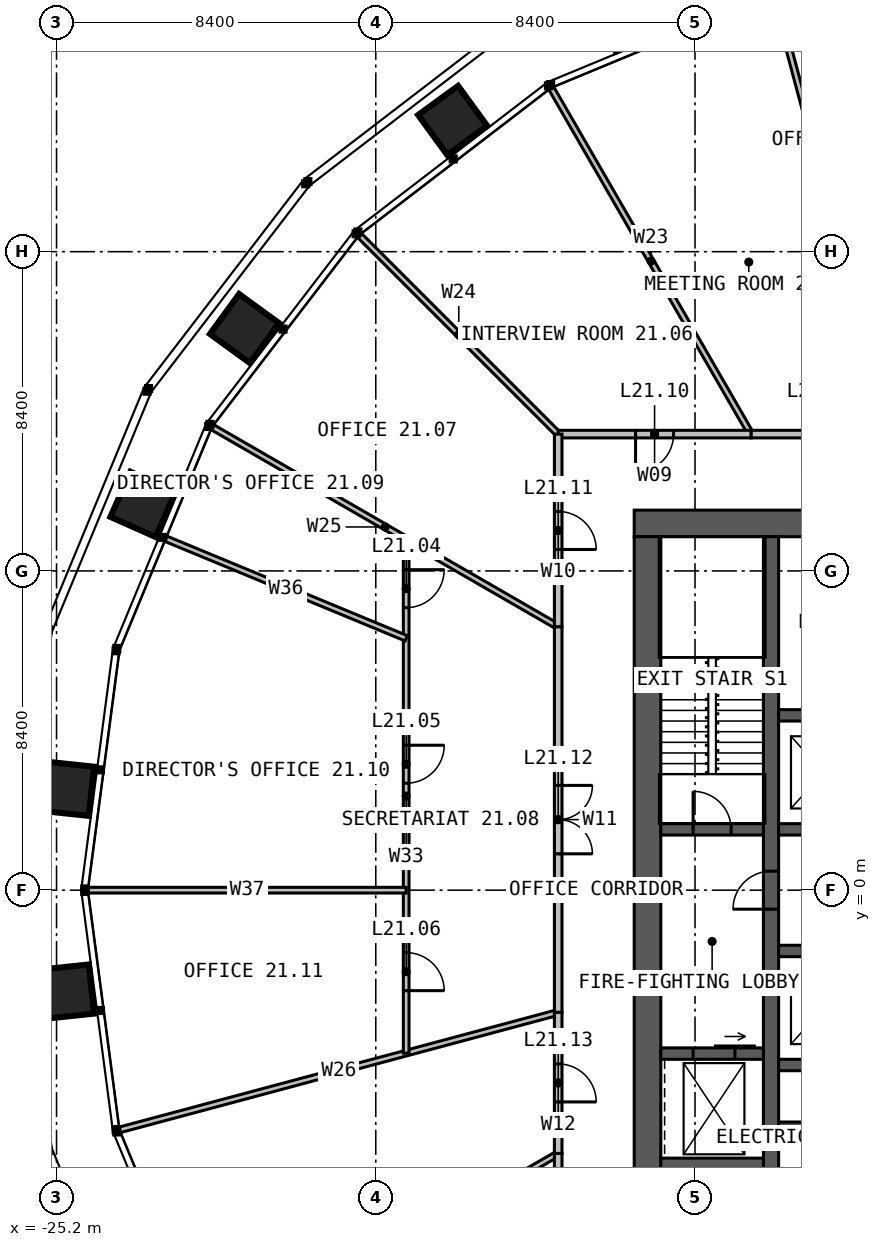
"""IFC4 building model, lengths in metres.
Left out: names, types, materials, properties, quantities, classifications, styles, units other than length and angle.
Written with IfcOpenShell. Run it as: python <this file> out.ifc"""

import sys

from ifc_helpers import new_model, si_unit, direction, frame, frame_2d, origin, place, context, subcontext, project, spatial, rectangle, extrude, element, fill, save


model = new_model("IFC4")
c1 = context("Model", 3, precision=1e-05, world=origin(), true_north=direction((0.0, 1.0)))
c2 = subcontext(c1, "Body", "Model", "MODEL_VIEW")
j1 = project(units=[si_unit("LENGTHUNIT", "METRE"), si_unit("PLANEANGLEUNIT", "RADIAN")], contexts=[c1])
p1 = place(None, origin())
s1 = spatial("IfcSite", under=j1, at=p1, CompositionType="ELEMENT")
p2 = place(p1, origin())
s2 = spatial("IfcBuilding", under=s1, at=p2, CompositionType="ELEMENT")
p3 = place(p2, frame((0.0, 0.0, 90.0)))
s3 = spatial("IfcBuildingStorey", under=s2, at=p3, CompositionType="ELEMENT", Elevation=90.0)
p4 = place(p3, frame((-10.0, 9.65, 0.0), z_axis=(0.0, 0.0, 1.0), x_axis=(1.0, 0.0, 0.0)))
e1 = element("IfcWall", 1, at=p4, inside=s3, PredefinedType="SOLIDWALL", context=c2, shape_type="SweptSolid", body=[
    extrude(rectangle(XDim=20.0, YDim=0.7, at=frame_2d((10.0, 0.0))), origin(), (0.0, 0.0, 1.0), 4.0),
])
p5 = place(p4, frame((9.4, 0.0, 0.0)))
e2 = element("IfcOpeningElement", 2, at=p5, cuts=e1, PredefinedType="OPENING", context=c2, shape_type="SweptSolid", body=[
    extrude(rectangle(XDim=1.2, YDim=2.2, at=frame_2d((0.6, 1.1))), frame((0.0, 0.36, 0.0), z_axis=(0.0, -1.0, 0.0), x_axis=(1.0, 0.0, 0.0)), (0.0, 0.0, 1.0), 0.72),
])
p6 = place(p3, frame((-9.65, 9.3, 0.0), z_axis=(0.0, 0.0, 1.0), x_axis=(0.0, -1.0, 0.0)))
e3 = element("IfcWall", 3, at=p6, inside=s3, PredefinedType="SOLIDWALL", context=c2, shape_type="SweptSolid", body=[
    extrude(rectangle(XDim=18.6, YDim=0.7, at=frame_2d((9.3, 0.0))), origin(), (0.0, 0.0, 1.0), 4.0),
])
p7 = place(p3, frame((-6.4, -9.3, 0.0), z_axis=(0.0, 0.0, 1.0), x_axis=(0.0, 1.0, 0.0)))
e4 = element("IfcWall", 4, at=p7, inside=s3, PredefinedType="SOLIDWALL", context=c2, shape_type="SweptSolid", body=[
    extrude(rectangle(XDim=18.6, YDim=0.4, at=frame_2d((9.3, 0.0))), origin(), (0.0, 0.0, 1.0), 4.0),
])
p8 = place(p7, frame((8.8, 0.0, 0.0)))
e5 = element("IfcOpeningElement", 5, at=p8, cuts=e4, PredefinedType="OPENING", context=c2, shape_type="SweptSolid", body=[
    extrude(rectangle(XDim=1.0, YDim=2.2, at=frame_2d((0.5, 1.1))), frame((0.0, 0.21, 0.0), z_axis=(0.0, -1.0, 0.0), x_axis=(1.0, 0.0, 0.0)), (0.0, 0.0, 1.0), 0.42),
])
p9 = place(p3, frame((-6.2, 1.6, 0.0), z_axis=(0.0, 0.0, 1.0), x_axis=(1.0, 0.0, 0.0)))
e6 = element("IfcWall", 6, at=p9, inside=s3, PredefinedType="SOLIDWALL", context=c2, shape_type="SweptSolid", body=[
    extrude(rectangle(XDim=4.85, YDim=0.3, at=frame_2d((2.425, 0.0))), origin(), (0.0, 0.0, 1.0), 4.0),
])
p10 = place(p9, frame((0.625, 0.0, 0.0)))
e7 = element("IfcOpeningElement", 7, at=p10, cuts=e6, PredefinedType="OPENING", context=c2, shape_type="SweptSolid", body=[
    extrude(rectangle(XDim=1.1, YDim=2.2, at=frame_2d((0.55, 1.1))), frame((0.0, 0.16, 0.0), z_axis=(0.0, -1.0, 0.0), x_axis=(1.0, 0.0, 0.0)), (0.0, 0.0, 1.0), 0.32),
])
p11 = place(p9, frame((3.15, 0.0, 0.0)))
e8 = element("IfcOpeningElement", 8, at=p11, cuts=e6, PredefinedType="OPENING", context=c2, shape_type="SweptSolid", body=[
    extrude(rectangle(XDim=1.1, YDim=2.2, at=frame_2d((0.55, 1.1))), frame((0.0, 0.16, 0.0), z_axis=(0.0, -1.0, 0.0), x_axis=(1.0, 0.0, 0.0)), (0.0, 0.0, 1.0), 0.32),
])
p12 = place(p3, frame((-6.2, 4.6, 0.0), z_axis=(0.0, 0.0, 1.0), x_axis=(1.0, 0.0, 0.0)))
e9 = element("IfcWall", 9, at=p12, inside=s3, PredefinedType="SOLIDWALL", context=c2, shape_type="SweptSolid", body=[
    extrude(rectangle(XDim=4.85, YDim=0.3, at=frame_2d((2.425, 0.0))), origin(), (0.0, 0.0, 1.0), 4.0),
])
p13 = place(p3, frame((-6.2, -1.6, 0.0), z_axis=(0.0, 0.0, 1.0), x_axis=(1.0, 0.0, 0.0)))
e10 = element("IfcWall", 10, at=p13, inside=s3, PredefinedType="SOLIDWALL", context=c2, shape_type="SweptSolid", body=[
    extrude(rectangle(XDim=7.4, YDim=0.3, at=frame_2d((3.7, 0.0))), origin(), (0.0, 0.0, 1.0), 4.0),
])
p14 = place(p13, frame((0.625, 0.0, 0.0)))
e11 = element("IfcOpeningElement", 11, at=p14, cuts=e10, PredefinedType="OPENING", context=c2, shape_type="SweptSolid", body=[
    extrude(rectangle(XDim=1.1, YDim=2.2, at=frame_2d((0.55, 1.1))), frame((0.0, 0.16, 0.0), z_axis=(0.0, -1.0, 0.0), x_axis=(1.0, 0.0, 0.0)), (0.0, 0.0, 1.0), 0.32),
])
p15 = place(p13, frame((3.15, 0.0, 0.0)))
e12 = element("IfcOpeningElement", 12, at=p15, cuts=e10, PredefinedType="OPENING", context=c2, shape_type="SweptSolid", body=[
    extrude(rectangle(XDim=1.1, YDim=2.2, at=frame_2d((0.55, 1.1))), frame((0.0, 0.16, 0.0), z_axis=(0.0, -1.0, 0.0), x_axis=(1.0, 0.0, 0.0)), (0.0, 0.0, 1.0), 0.32),
])
p16 = place(p13, frame((5.675, 0.0, 0.0)))
e13 = element("IfcOpeningElement", 13, at=p16, cuts=e10, PredefinedType="OPENING", context=c2, shape_type="SweptSolid", body=[
    extrude(rectangle(XDim=1.1, YDim=2.2, at=frame_2d((0.55, 1.1))), frame((0.0, 0.16, 0.0), z_axis=(0.0, -1.0, 0.0), x_axis=(1.0, 0.0, 0.0)), (0.0, 0.0, 1.0), 0.32),
])
p17 = place(p3, frame((-6.2, -4.6, 0.0), z_axis=(0.0, 0.0, 1.0), x_axis=(1.0, 0.0, 0.0)))
e14 = element("IfcWall", 14, at=p17, inside=s3, PredefinedType="SOLIDWALL", context=c2, shape_type="SweptSolid", body=[
    extrude(rectangle(XDim=7.4, YDim=0.3, at=frame_2d((3.7, 0.0))), origin(), (0.0, 0.0, 1.0), 4.0),
])
p18 = place(p3, frame((-6.2, -6.2, 0.0), z_axis=(0.0, 0.0, 1.0), x_axis=(1.0, 0.0, 0.0)))
e15 = element("IfcWall", 15, at=p18, inside=s3, PredefinedType="SOLIDWALL", context=c2, shape_type="SweptSolid", body=[
    extrude(rectangle(XDim=7.4, YDim=0.2, at=frame_2d((3.7, 0.0))), origin(), (0.0, 0.0, 1.0), 4.0),
])
p19 = place(p3, frame((-9.3, 1.6, 0.0), z_axis=(0.0, 0.0, 1.0), x_axis=(1.0, 0.0, 0.0)))
e16 = element("IfcWall", 16, at=p19, inside=s3, PredefinedType="SOLIDWALL", context=c2, shape_type="SweptSolid", body=[
    extrude(rectangle(XDim=2.7, YDim=0.3, at=frame_2d((1.35, 0.0))), origin(), (0.0, 0.0, 1.0), 4.0),
])
p20 = place(p19, frame((0.85, 0.0, 0.0)))
e17 = element("IfcOpeningElement", 17, at=p20, cuts=e16, PredefinedType="OPENING", context=c2, shape_type="SweptSolid", body=[
    extrude(rectangle(XDim=1.0, YDim=2.2, at=frame_2d((0.5, 1.1))), frame((0.0, 0.16, 0.0), z_axis=(0.0, -1.0, 0.0), x_axis=(1.0, 0.0, 0.0)), (0.0, 0.0, 1.0), 0.32),
])
p21 = place(p3, frame((-9.3, -4.3, 0.0), z_axis=(0.0, 0.0, 1.0), x_axis=(1.0, 0.0, 0.0)))
e18 = element("IfcWall", 18, at=p21, inside=s3, PredefinedType="SOLIDWALL", context=c2, shape_type="SweptSolid", body=[
    extrude(rectangle(XDim=2.7, YDim=0.3, at=frame_2d((1.35, 0.0))), origin(), (0.0, 0.0, 1.0), 4.0),
])
p22 = place(p21, frame((0.85, 0.0, 0.0)))
e19 = element("IfcOpeningElement", 19, at=p22, cuts=e18, PredefinedType="OPENING", context=c2, shape_type="SweptSolid", body=[
    extrude(rectangle(XDim=1.1, YDim=2.2, at=frame_2d((0.55, 1.1))), frame((0.0, 0.16, 0.0), z_axis=(0.0, -1.0, 0.0), x_axis=(1.0, 0.0, 0.0)), (0.0, 0.0, 1.0), 0.32),
])
p23 = place(p3, frame((-9.3, -7.2, 0.0), z_axis=(0.0, 0.0, 1.0), x_axis=(1.0, 0.0, 0.0)))
e20 = element("IfcWall", 20, at=p23, inside=s3, PredefinedType="SOLIDWALL", context=c2, shape_type="SweptSolid", body=[
    extrude(rectangle(XDim=2.7, YDim=0.3, at=frame_2d((1.35, 0.0))), origin(), (0.0, 0.0, 1.0), 4.0),
])
p24 = place(p3, frame((-3.215, 12.0, 0.0), z_axis=(0.0, 0.0, 1.0), x_axis=(-0.258816099716, 0.965926615498, 0.0)))
e21 = element("IfcWall", 21, at=p24, inside=s3, PredefinedType="PARTITIONING", context=c2, shape_type="SweptSolid", body=[
    extrude(rectangle(XDim=11.947, YDim=0.15, at=frame_2d((5.973, 0.0))), origin(), (0.0, 0.0, 1.0), 2.89),
])
p25 = place(p3, frame((-6.928, 12.0, 0.0), z_axis=(0.0, 0.0, 1.0), x_axis=(-0.499995153367, 0.866028201971, 0.0)))
e22 = element("IfcWall", 22, at=p25, inside=s3, PredefinedType="PARTITIONING", context=c2, shape_type="SweptSolid", body=[
    extrude(rectangle(XDim=10.514, YDim=0.15, at=frame_2d((5.257, 0.0))), origin(), (0.0, 0.0, 1.0), 2.89),
])
p26 = place(p3, frame((-12.0, 12.0, 0.0), z_axis=(0.0, 0.0, 1.0), x_axis=(-0.707106781187, 0.707106781187, 0.0)))
e23 = element("IfcWall", 23, at=p26, inside=s3, PredefinedType="PARTITIONING", context=c2, shape_type="SweptSolid", body=[
    extrude(rectangle(XDim=7.4, YDim=0.15, at=frame_2d((3.7, 0.0))), origin(), (0.0, 0.0, 1.0), 2.89),
])
p27 = place(p3, frame((-12.0, 6.928, 0.0), z_axis=(0.0, 0.0, 1.0), x_axis=(-0.866028201971, 0.499995153367, 0.0)))
e24 = element("IfcWall", 24, at=p27, inside=s3, PredefinedType="PARTITIONING", context=c2, shape_type="SweptSolid", body=[
    extrude(rectangle(XDim=10.514, YDim=0.15, at=frame_2d((5.257, 0.0))), origin(), (0.0, 0.0, 1.0), 2.89),
])
p28 = place(p3, frame((-12.0, -3.215, 0.0), z_axis=(0.0, 0.0, 1.0), x_axis=(-0.965926615498, -0.258816099716, 0.0)))
e25 = element("IfcWall", 25, at=p28, inside=s3, PredefinedType="PARTITIONING", context=c2, shape_type="SweptSolid", body=[
    extrude(rectangle(XDim=11.947, YDim=0.15, at=frame_2d((5.973, 0.0))), origin(), (0.0, 0.0, 1.0), 2.89),
])
p29 = place(p3, frame((-12.0, -6.928, 0.0), z_axis=(0.0, 0.0, 1.0), x_axis=(-0.866028201971, -0.499995153367, 0.0)))
e26 = element("IfcWall", 26, at=p29, inside=s3, PredefinedType="PARTITIONING", context=c2, shape_type="SweptSolid", body=[
    extrude(rectangle(XDim=10.514, YDim=0.15, at=frame_2d((5.257, 0.0))), origin(), (0.0, 0.0, 1.0), 2.89),
])
p30 = place(p3, frame((-3.215, 12.0, 0.0), z_axis=(0.0, 0.0, 1.0), x_axis=(-1.0, 0.0, 0.0)))
e27 = element("IfcWall", 27, at=p30, inside=s3, PredefinedType="PARTITIONING", context=c2, shape_type="SweptSolid", body=[
    extrude(rectangle(XDim=3.713, YDim=0.2, at=frame_2d((1.856, 0.0))), origin(), (0.0, 0.0, 1.0), 3.8),
])
p31 = place(p30, frame((1.356, 0.0, 0.0)))
e28 = element("IfcOpeningElement", 28, at=p31, cuts=e27, PredefinedType="OPENING", context=c2, shape_type="SweptSolid", body=[
    extrude(rectangle(XDim=1.0, YDim=2.2, at=frame_2d((0.5, 1.1))), frame((0.0, 0.11, 0.0), z_axis=(0.0, -1.0, 0.0), x_axis=(1.0, 0.0, 0.0)), (0.0, 0.0, 1.0), 0.22),
])
p32 = place(p3, frame((-6.928, 12.0, 0.0), z_axis=(0.0, 0.0, 1.0), x_axis=(-1.0, 0.0, 0.0)))
e29 = element("IfcWall", 29, at=p32, inside=s3, PredefinedType="PARTITIONING", context=c2, shape_type="SweptSolid", body=[
    extrude(rectangle(XDim=5.072, YDim=0.2, at=frame_2d((2.536, 0.0))), origin(), (0.0, 0.0, 1.0), 3.8),
])
p33 = place(p32, frame((2.036, 0.0, 0.0)))
e30 = element("IfcOpeningElement", 30, at=p33, cuts=e29, PredefinedType="OPENING", context=c2, shape_type="SweptSolid", body=[
    extrude(rectangle(XDim=1.0, YDim=2.2, at=frame_2d((0.5, 1.1))), frame((0.0, 0.11, 0.0), z_axis=(0.0, -1.0, 0.0), x_axis=(1.0, 0.0, 0.0)), (0.0, 0.0, 1.0), 0.22),
])
p34 = place(p3, frame((-12.0, 12.0, 0.0), z_axis=(0.0, 0.0, 1.0), x_axis=(0.0, -1.0, 0.0)))
e31 = element("IfcWall", 31, at=p34, inside=s3, PredefinedType="PARTITIONING", context=c2, shape_type="SweptSolid", body=[
    extrude(rectangle(XDim=5.072, YDim=0.2, at=frame_2d((2.536, 0.0))), origin(), (0.0, 0.0, 1.0), 3.8),
])
p35 = place(p34, frame((2.036, 0.0, 0.0)))
e32 = element("IfcOpeningElement", 32, at=p35, cuts=e31, PredefinedType="OPENING", context=c2, shape_type="SweptSolid", body=[
    extrude(rectangle(XDim=1.0, YDim=2.2, at=frame_2d((0.5, 1.1))), frame((0.0, 0.11, 0.0), z_axis=(0.0, -1.0, 0.0), x_axis=(1.0, 0.0, 0.0)), (0.0, 0.0, 1.0), 0.22),
])
p36 = place(p3, frame((-16.0, 9.238, 0.0), z_axis=(0.0, 0.0, 1.0), x_axis=(0.0, -1.0, 0.0)))
e33 = element("IfcWall", 33, at=p36, inside=s3, PredefinedType="PARTITIONING", context=c2, shape_type="SweptSolid", body=[
    extrude(rectangle(XDim=13.525, YDim=0.15, at=frame_2d((6.762, 0.0))), origin(), (0.0, 0.0, 1.0), 2.89),
])
p37 = place(p36, frame((0.805, 0.0, 0.0)))
e34 = element("IfcOpeningElement", 34, at=p37, cuts=e33, PredefinedType="OPENING", context=c2, shape_type="SweptSolid", body=[
    extrude(rectangle(XDim=1.0, YDim=2.2, at=frame_2d((0.5, 1.1))), frame((0.0, 0.085, 0.0), z_axis=(0.0, -1.0, 0.0), x_axis=(1.0, 0.0, 0.0)), (0.0, 0.0, 1.0), 0.17),
])
p38 = place(p36, frame((5.424, 0.0, 0.0)))
e35 = element("IfcOpeningElement", 35, at=p38, cuts=e33, PredefinedType="OPENING", context=c2, shape_type="SweptSolid", body=[
    extrude(rectangle(XDim=1.0, YDim=2.2, at=frame_2d((0.5, 1.1))), frame((0.0, 0.085, 0.0), z_axis=(0.0, -1.0, 0.0), x_axis=(1.0, 0.0, 0.0)), (0.0, 0.0, 1.0), 0.17),
])
p39 = place(p36, frame((10.881, 0.0, 0.0)))
e36 = element("IfcOpeningElement", 36, at=p39, cuts=e33, PredefinedType="OPENING", context=c2, shape_type="SweptSolid", body=[
    extrude(rectangle(XDim=1.0, YDim=2.2, at=frame_2d((0.5, 1.1))), frame((0.0, 0.085, 0.0), z_axis=(0.0, -1.0, 0.0), x_axis=(1.0, 0.0, 0.0)), (0.0, 0.0, 1.0), 0.17),
])
p40 = place(p3, frame((-16.0, 6.627, 0.0), z_axis=(0.0, 0.0, 1.0), x_axis=(-0.923878127723, 0.382686823805, 0.0)))
e37 = element("IfcWall", 37, at=p40, inside=s3, PredefinedType="PARTITIONING", context=c2, shape_type="SweptSolid", body=[
    extrude(rectangle(XDim=6.844, YDim=0.15, at=frame_2d((3.422, 0.0))), origin(), (0.0, 0.0, 1.0), 2.79),
])
p41 = place(p3, frame((-16.0, 0.0, 0.0), z_axis=(0.0, 0.0, 1.0), x_axis=(-1.0, 0.0, 0.0)))
e38 = element("IfcWall", 38, at=p41, inside=s3, PredefinedType="PARTITIONING", context=c2, shape_type="SweptSolid", body=[
    extrude(rectangle(XDim=8.37, YDim=0.15, at=frame_2d((4.185, 0.0))), origin(), (0.0, 0.0, 1.0), 2.89),
])
p42 = place(p3, frame((-12.0, 6.928, 0.0), z_axis=(0.0, 0.0, 1.0), x_axis=(0.0, -1.0, 0.0)))
e39 = element("IfcWall", 39, at=p42, inside=s3, PredefinedType="PARTITIONING", context=c2, shape_type="SweptSolid", body=[
    extrude(rectangle(XDim=10.144, YDim=0.2, at=frame_2d((5.072, 0.0))), origin(), (0.0, 0.0, 1.0), 3.8),
])
p43 = place(p42, frame((4.172, 0.0, 0.0)))
e40 = element("IfcOpeningElement", 40, at=p43, cuts=e39, PredefinedType="OPENING", context=c2, shape_type="SweptSolid", body=[
    extrude(rectangle(XDim=1.8, YDim=2.2, at=frame_2d((0.9, 1.1))), frame((0.0, 0.11, 0.0), z_axis=(0.0, -1.0, 0.0), x_axis=(1.0, 0.0, 0.0)), (0.0, 0.0, 1.0), 0.22),
])
p44 = place(p3, frame((-12.0, -3.215, 0.0), z_axis=(0.0, 0.0, 1.0), x_axis=(0.0, -1.0, 0.0)))
e41 = element("IfcWall", 41, at=p44, inside=s3, PredefinedType="PARTITIONING", context=c2, shape_type="SweptSolid", body=[
    extrude(rectangle(XDim=3.713, YDim=0.2, at=frame_2d((1.856, 0.0))), origin(), (0.0, 0.0, 1.0), 3.8),
])
p45 = place(p44, frame((1.356, 0.0, 0.0)))
e42 = element("IfcOpeningElement", 42, at=p45, cuts=e41, PredefinedType="OPENING", context=c2, shape_type="SweptSolid", body=[
    extrude(rectangle(XDim=1.0, YDim=2.2, at=frame_2d((0.5, 1.1))), frame((0.0, 0.11, 0.0), z_axis=(0.0, -1.0, 0.0), x_axis=(1.0, 0.0, 0.0)), (0.0, 0.0, 1.0), 0.22),
])
p46 = place(p3, frame((-12.0, -6.928, 0.0), z_axis=(0.0, 0.0, 1.0), x_axis=(0.0, -1.0, 0.0)))
e43 = element("IfcWall", 43, at=p46, inside=s3, PredefinedType="PARTITIONING", context=c2, shape_type="SweptSolid", body=[
    extrude(rectangle(XDim=5.072, YDim=0.2, at=frame_2d((2.536, 0.0))), origin(), (0.0, 0.0, 1.0), 3.8),
])
p47 = place(p46, frame((2.036, 0.0, 0.0)))
e44 = element("IfcOpeningElement", 44, at=p47, cuts=e43, PredefinedType="OPENING", context=c2, shape_type="SweptSolid", body=[
    extrude(rectangle(XDim=1.0, YDim=2.2, at=frame_2d((0.5, 1.1))), frame((0.0, 0.11, 0.0), z_axis=(0.0, -1.0, 0.0), x_axis=(1.0, 0.0, 0.0)), (0.0, 0.0, 1.0), 0.22),
])
p48 = place(p8, origin())
e45 = element("IfcDoor", 45, at=p48, inside=s3, OperationType="SINGLE_SWING_LEFT", PredefinedType="DOOR", context=c2, shape_type="SweptSolid", body=[
    extrude(rectangle(XDim=1.0, YDim=2.2, at=frame_2d((0.5, 1.1))), frame((0.0, 0.025, 0.0), z_axis=(0.0, -1.0, 0.0), x_axis=(1.0, 0.0, 0.0)), (0.0, 0.0, 1.0), 0.05),
])
fill(e5, e45)
p49 = place(p20, origin())
e46 = element("IfcDoor", 46, at=p49, inside=s3, OperationType="SINGLE_SWING_LEFT", PredefinedType="DOOR", context=c2, shape_type="SweptSolid", body=[
    extrude(rectangle(XDim=1.0, YDim=2.2, at=frame_2d((0.5, 1.1))), frame((0.0, 0.025, 0.0), z_axis=(0.0, -1.0, 0.0), x_axis=(1.0, 0.0, 0.0)), (0.0, 0.0, 1.0), 0.05),
])
fill(e17, e46)
p50 = place(p22, origin())
e47 = element("IfcDoor", 47, at=p50, inside=s3, OperationType="SLIDING_TO_LEFT", PredefinedType="DOOR", context=c2, shape_type="SweptSolid", body=[
    extrude(rectangle(XDim=1.1, YDim=2.2, at=frame_2d((0.55, 1.1))), frame((0.0, 0.025, 0.0), z_axis=(0.0, -1.0, 0.0), x_axis=(1.0, 0.0, 0.0)), (0.0, 0.0, 1.0), 0.05),
])
fill(e19, e47)
p51 = place(p33, origin())
e48 = element("IfcDoor", 48, at=p51, inside=s3, OperationType="SINGLE_SWING_RIGHT", PredefinedType="DOOR", context=c2, shape_type="SweptSolid", body=[
    extrude(rectangle(XDim=1.0, YDim=2.2, at=frame_2d((0.5, 1.1))), frame((0.0, 0.025, 0.0), z_axis=(0.0, -1.0, 0.0), x_axis=(1.0, 0.0, 0.0)), (0.0, 0.0, 1.0), 0.05),
])
fill(e30, e48)
p52 = place(p35, origin())
e49 = element("IfcDoor", 49, at=p52, inside=s3, OperationType="SINGLE_SWING_RIGHT", PredefinedType="DOOR", context=c2, shape_type="SweptSolid", body=[
    extrude(rectangle(XDim=1.0, YDim=2.2, at=frame_2d((0.5, 1.1))), frame((0.0, 0.025, 0.0), z_axis=(0.0, -1.0, 0.0), x_axis=(1.0, 0.0, 0.0)), (0.0, 0.0, 1.0), 0.05),
])
fill(e32, e49)
p53 = place(p37, origin())
e50 = element("IfcDoor", 50, at=p53, inside=s3, OperationType="SINGLE_SWING_LEFT", PredefinedType="DOOR", context=c2, shape_type="SweptSolid", body=[
    extrude(rectangle(XDim=1.0, YDim=2.2, at=frame_2d((0.5, 1.1))), frame((0.0, 0.025, 0.0), z_axis=(0.0, -1.0, 0.0), x_axis=(1.0, 0.0, 0.0)), (0.0, 0.0, 1.0), 0.05),
])
fill(e34, e50)
p54 = place(p38, origin())
e51 = element("IfcDoor", 51, at=p54, inside=s3, OperationType="SINGLE_SWING_LEFT", PredefinedType="DOOR", context=c2, shape_type="SweptSolid", body=[
    extrude(rectangle(XDim=1.0, YDim=2.2, at=frame_2d((0.5, 1.1))), frame((0.0, 0.025, 0.0), z_axis=(0.0, -1.0, 0.0), x_axis=(1.0, 0.0, 0.0)), (0.0, 0.0, 1.0), 0.05),
])
fill(e35, e51)
p55 = place(p39, origin())
e52 = element("IfcDoor", 52, at=p55, inside=s3, OperationType="SINGLE_SWING_RIGHT", PredefinedType="DOOR", context=c2, shape_type="SweptSolid", body=[
    extrude(rectangle(XDim=1.0, YDim=2.2, at=frame_2d((0.5, 1.1))), frame((0.0, 0.025, 0.0), z_axis=(0.0, -1.0, 0.0), x_axis=(1.0, 0.0, 0.0)), (0.0, 0.0, 1.0), 0.05),
])
fill(e36, e52)
p56 = place(p43, origin())
e53 = element("IfcDoor", 53, at=p56, inside=s3, OperationType="DOUBLE_DOOR_SINGLE_SWING", PredefinedType="DOOR", context=c2, shape_type="SweptSolid", body=[
    extrude(rectangle(XDim=1.8, YDim=2.2, at=frame_2d((0.9, 1.1))), frame((0.0, 0.025, 0.0), z_axis=(0.0, -1.0, 0.0), x_axis=(1.0, 0.0, 0.0)), (0.0, 0.0, 1.0), 0.05),
])
fill(e40, e53)
p57 = place(p45, origin())
e54 = element("IfcDoor", 54, at=p57, inside=s3, OperationType="SINGLE_SWING_RIGHT", PredefinedType="DOOR", context=c2, shape_type="SweptSolid", body=[
    extrude(rectangle(XDim=1.0, YDim=2.2, at=frame_2d((0.5, 1.1))), frame((0.0, 0.025, 0.0), z_axis=(0.0, -1.0, 0.0), x_axis=(1.0, 0.0, 0.0)), (0.0, 0.0, 1.0), 0.05),
])
fill(e42, e54)
save(model, sys.argv[1])
